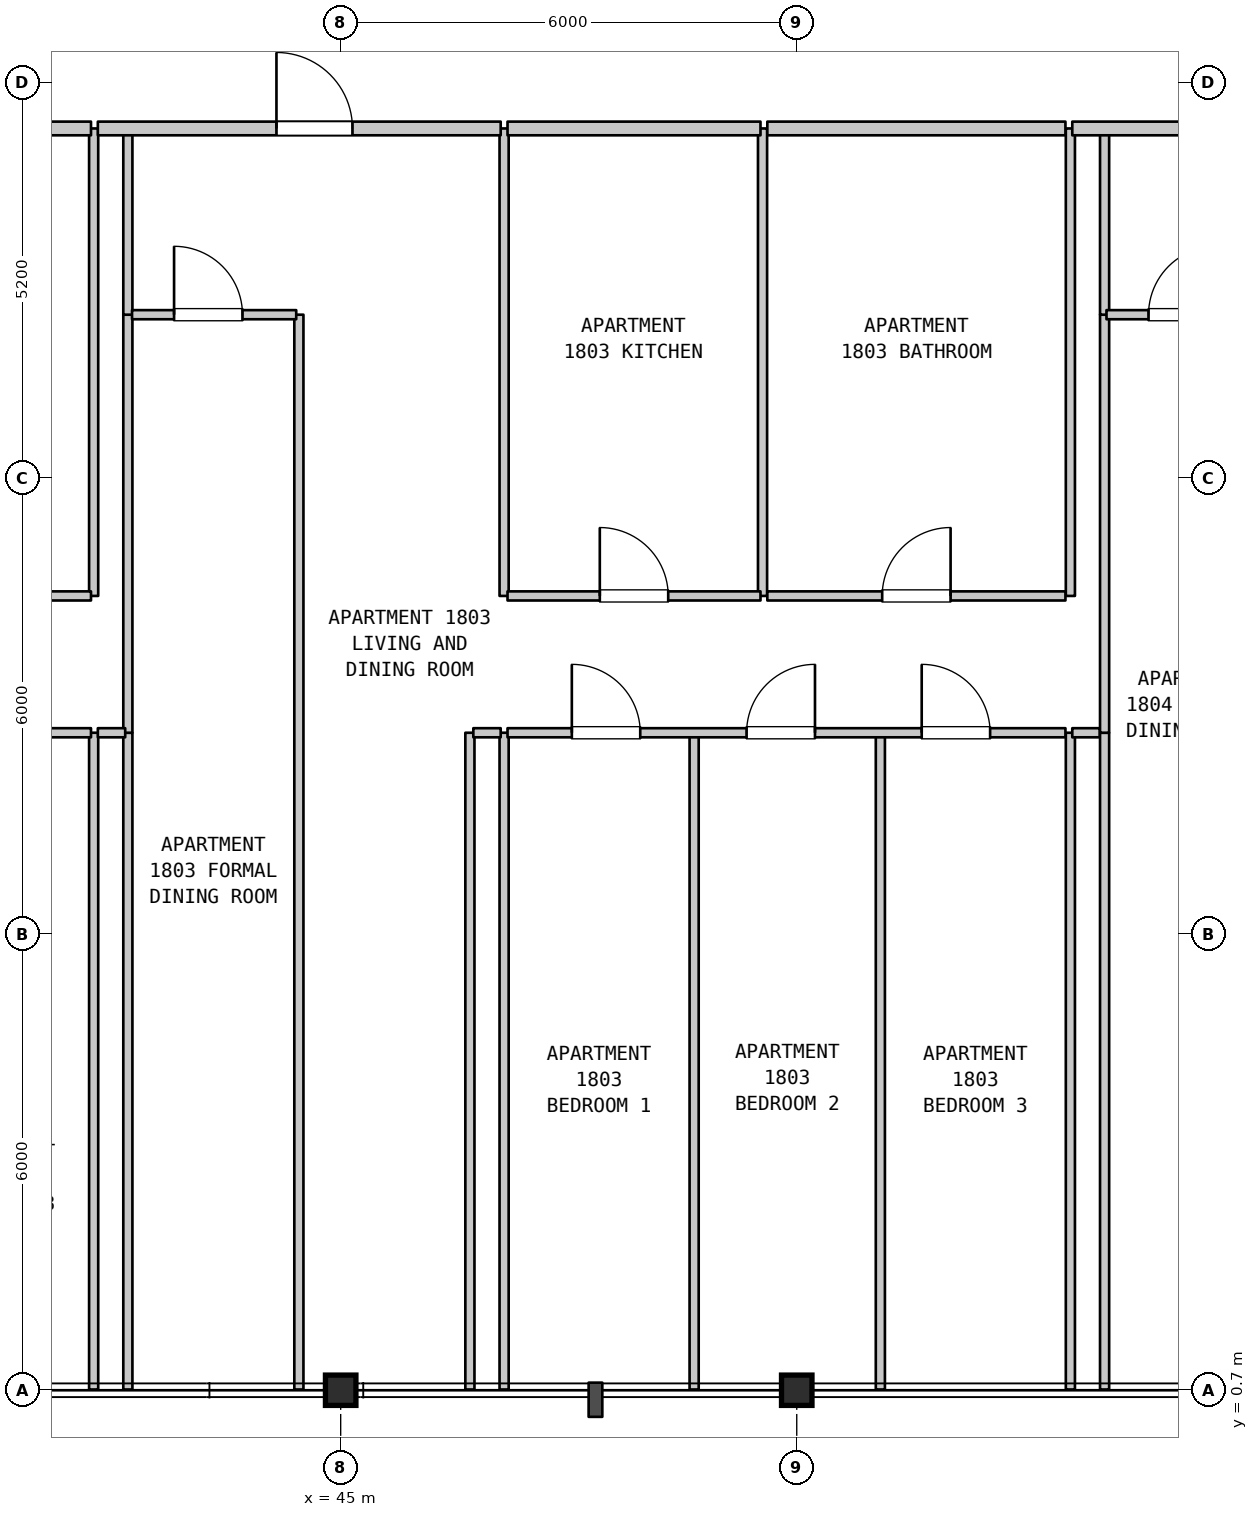
"""IFC4 building model, lengths in metres.
Left out: names, types, materials, properties, quantities, classifications, styles, units other than length and angle.
Written with IfcOpenShell. Run it as: python <this file> out.ifc"""

import sys

from ifc_helpers import new_model, si_unit, direction, frame, frame_2d, origin, origin_2d, place, context, subcontext, project, spatial, rectangle, i_section, extrude, element, fill, save


model = new_model("IFC4")
c1 = context("Model", 3, precision=1e-05, world=origin(), true_north=direction((0.0, 1.0)))
c2 = subcontext(c1, "Body", "Model", "MODEL_VIEW")
j1 = project(units=[si_unit("LENGTHUNIT", "METRE"), si_unit("PLANEANGLEUNIT", "RADIAN")], contexts=[c1])
p1 = place(None, origin())
s1 = spatial("IfcSite", under=j1, at=p1, CompositionType="ELEMENT")
p2 = place(p1, origin())
s2 = spatial("IfcBuilding", under=s1, at=p2, CompositionType="ELEMENT")
p3 = place(p2, frame((0.0, 0.0, 77.5)))
s3 = spatial("IfcBuildingStorey", under=s2, at=p3, CompositionType="ELEMENT", Elevation=77.5)
for number, where, z_axis, x_axis in (
    (1, (45.0, 0.7, 0.0), (0.0, 0.0, 1.0), (1.0, 0.0, 0.0)),
    (2, (51.0, 0.7, 0.0), (0.0, 0.0, 1.0), (1.0, 0.0, 0.0)),
):
    element("IfcColumn", number, at=place(p3, frame(where, z_axis=z_axis, x_axis=x_axis)), inside=s3, PredefinedType="COLUMN", context=c2, shape_type="SweptSolid", body=[
        extrude(i_section(OverallWidth=0.401, OverallDepth=0.399, WebThickness=0.025, FlangeThickness=0.04, FilletRadius=0.015, at=origin_2d()), origin(), (0.0, 0.0, 1.0), 3.7),
    ])
p4 = place(p3, frame((41.75, 0.71, 0.0), z_axis=(0.0, 0.0, 1.0), x_axis=(0.0, 1.0, 0.0)))
e3 = element("IfcWall", 3, at=p4, inside=s3, PredefinedType="PARTITIONING", context=c2, shape_type="SweptSolid", body=[
    extrude(rectangle(XDim=8.64, YDim=0.12, at=frame_2d((4.32, 0.0))), origin(), (0.0, 0.0, 1.0), 3.28),
])
p5 = place(p3, frame((41.75, 11.15, 0.0), z_axis=(0.0, 0.0, 1.0), x_axis=(0.0, 1.0, 0.0)))
e4 = element("IfcWall", 4, at=p5, inside=s3, PredefinedType="PARTITIONING", context=c2, shape_type="SweptSolid", body=[
    extrude(rectangle(XDim=6.15, YDim=0.12, at=frame_2d((3.075, 0.0))), origin(), (0.0, 0.0, 1.0), 3.28),
])
p6 = place(p3, frame((42.2, 0.71, 0.0), z_axis=(0.0, 0.0, 1.0), x_axis=(0.0, 1.0, 0.0)))
e5 = element("IfcWall", 5, at=p6, inside=s3, PredefinedType="PARTITIONING", context=c2, shape_type="SweptSolid", body=[
    extrude(rectangle(XDim=8.64, YDim=0.12, at=frame_2d((4.32, 0.0))), origin(), (0.0, 0.0, 1.0), 3.28),
])
p7 = place(p3, frame((42.2, 9.35, 0.0), z_axis=(0.0, 0.0, 1.0), x_axis=(0.0, 1.0, 0.0)))
e6 = element("IfcWall", 6, at=p7, inside=s3, PredefinedType="PARTITIONING", context=c2, shape_type="SweptSolid", body=[
    extrude(rectangle(XDim=5.5, YDim=0.12, at=frame_2d((2.75, 0.0))), origin(), (0.0, 0.0, 1.0), 3.28),
])
p8 = place(p3, frame((42.2, 14.85, 0.0), z_axis=(0.0, 0.0, 1.0), x_axis=(0.0, 1.0, 0.0)))
e7 = element("IfcWall", 7, at=p8, inside=s3, PredefinedType="PARTITIONING", context=c2, shape_type="SweptSolid", body=[
    extrude(rectangle(XDim=2.45, YDim=0.12, at=frame_2d((1.225, 0.0))), origin(), (0.0, 0.0, 1.0), 3.28),
])
p9 = place(p3, frame((44.45, 0.71, 0.0), z_axis=(0.0, 0.0, 1.0), x_axis=(0.0, 1.0, 0.0)))
e8 = element("IfcWall", 8, at=p9, inside=s3, PredefinedType="PARTITIONING", context=c2, shape_type="SweptSolid", body=[
    extrude(rectangle(XDim=14.14, YDim=0.12, at=frame_2d((7.07, 0.0))), origin(), (0.0, 0.0, 1.0), 3.28),
])
for number, where, z_axis, x_axis in (
    (9, (46.7, 0.71, 0.0), (0.0, 0.0, 1.0), (0.0, 1.0, 0.0)),
    (10, (47.15, 0.71, 0.0), (0.0, 0.0, 1.0), (0.0, 1.0, 0.0)),
):
    element("IfcWall", number, at=place(p3, frame(where, z_axis=z_axis, x_axis=x_axis)), inside=s3, PredefinedType="PARTITIONING", context=c2, shape_type="SweptSolid", body=[
        extrude(rectangle(XDim=8.64, YDim=0.12, at=frame_2d((4.32, 0.0))), origin(), (0.0, 0.0, 1.0), 3.28),
    ])
p10 = place(p3, frame((47.15, 11.15, 0.0), z_axis=(0.0, 0.0, 1.0), x_axis=(0.0, 1.0, 0.0)))
e11 = element("IfcWall", 11, at=p10, inside=s3, PredefinedType="PARTITIONING", context=c2, shape_type="SweptSolid", body=[
    extrude(rectangle(XDim=6.15, YDim=0.12, at=frame_2d((3.075, 0.0))), origin(), (0.0, 0.0, 1.0), 3.28),
])
p11 = place(p3, frame((49.65, 0.71, 0.0), z_axis=(0.0, 0.0, 1.0), x_axis=(0.0, 1.0, 0.0)))
e12 = element("IfcWall", 12, at=p11, inside=s3, PredefinedType="PARTITIONING", context=c2, shape_type="SweptSolid", body=[
    extrude(rectangle(XDim=8.64, YDim=0.12, at=frame_2d((4.32, 0.0))), origin(), (0.0, 0.0, 1.0), 3.28),
])
p12 = place(p3, frame((50.55, 11.15, 0.0), z_axis=(0.0, 0.0, 1.0), x_axis=(0.0, 1.0, 0.0)))
e13 = element("IfcWall", 13, at=p12, inside=s3, PredefinedType="PARTITIONING", context=c2, shape_type="SweptSolid", body=[
    extrude(rectangle(XDim=6.15, YDim=0.12, at=frame_2d((3.075, 0.0))), origin(), (0.0, 0.0, 1.0), 3.28),
])
for number, where, z_axis, x_axis in (
    (14, (52.1, 0.71, 0.0), (0.0, 0.0, 1.0), (0.0, 1.0, 0.0)),
    (15, (54.6, 0.71, 0.0), (0.0, 0.0, 1.0), (0.0, 1.0, 0.0)),
):
    element("IfcWall", number, at=place(p3, frame(where, z_axis=z_axis, x_axis=x_axis)), inside=s3, PredefinedType="PARTITIONING", context=c2, shape_type="SweptSolid", body=[
        extrude(rectangle(XDim=8.64, YDim=0.12, at=frame_2d((4.32, 0.0))), origin(), (0.0, 0.0, 1.0), 3.28),
    ])
p13 = place(p3, frame((54.6, 11.15, 0.0), z_axis=(0.0, 0.0, 1.0), x_axis=(0.0, 1.0, 0.0)))
e16 = element("IfcWall", 16, at=p13, inside=s3, PredefinedType="PARTITIONING", context=c2, shape_type="SweptSolid", body=[
    extrude(rectangle(XDim=6.15, YDim=0.12, at=frame_2d((3.075, 0.0))), origin(), (0.0, 0.0, 1.0), 3.28),
])
p14 = place(p3, frame((55.05, 0.71, 0.0), z_axis=(0.0, 0.0, 1.0), x_axis=(0.0, 1.0, 0.0)))
e17 = element("IfcWall", 17, at=p14, inside=s3, PredefinedType="PARTITIONING", context=c2, shape_type="SweptSolid", body=[
    extrude(rectangle(XDim=8.64, YDim=0.12, at=frame_2d((4.32, 0.0))), origin(), (0.0, 0.0, 1.0), 3.28),
])
p15 = place(p3, frame((55.05, 9.35, 0.0), z_axis=(0.0, 0.0, 1.0), x_axis=(0.0, 1.0, 0.0)))
e18 = element("IfcWall", 18, at=p15, inside=s3, PredefinedType="PARTITIONING", context=c2, shape_type="SweptSolid", body=[
    extrude(rectangle(XDim=5.5, YDim=0.12, at=frame_2d((2.75, 0.0))), origin(), (0.0, 0.0, 1.0), 3.28),
])
p16 = place(p3, frame((55.05, 14.85, 0.0), z_axis=(0.0, 0.0, 1.0), x_axis=(0.0, 1.0, 0.0)))
e19 = element("IfcWall", 19, at=p16, inside=s3, PredefinedType="PARTITIONING", context=c2, shape_type="SweptSolid", body=[
    extrude(rectangle(XDim=2.45, YDim=0.12, at=frame_2d((1.225, 0.0))), origin(), (0.0, 0.0, 1.0), 3.28),
])
p17 = place(p3, frame((34.635, 9.35, 0.0), z_axis=(0.0, 0.0, 1.0), x_axis=(1.0, 0.0, 0.0)))
e20 = element("IfcWall", 20, at=p17, inside=s3, PredefinedType="PARTITIONING", context=c2, shape_type="SweptSolid", body=[
    extrude(rectangle(XDim=7.08, YDim=0.12, at=frame_2d((3.54, 0.0))), origin(), (0.0, 0.0, 1.0), 3.28),
])
p18 = place(p17, frame((0.875, 0.0, 0.0)))
e21 = element("IfcOpeningElement", 21, at=p18, cuts=e20, PredefinedType="OPENING", context=c2, shape_type="SweptSolid", body=[
    extrude(rectangle(XDim=0.9, YDim=2.15, at=frame_2d((0.45, 1.075))), frame((0.0, 0.07, 0.0), z_axis=(0.0, -1.0, 0.0), x_axis=(1.0, 0.0, 0.0)), (0.0, 0.0, 1.0), 0.14),
])
p19 = place(p17, frame((3.019, 0.0, 0.0)))
e22 = element("IfcOpeningElement", 22, at=p19, cuts=e20, PredefinedType="OPENING", context=c2, shape_type="SweptSolid", body=[
    extrude(rectangle(XDim=0.9, YDim=2.15, at=frame_2d((0.45, 1.075))), frame((0.0, 0.07, 0.0), z_axis=(0.0, -1.0, 0.0), x_axis=(1.0, 0.0, 0.0)), (0.0, 0.0, 1.0), 0.14),
])
p20 = place(p17, frame((5.305, 0.0, 0.0)))
e23 = element("IfcOpeningElement", 23, at=p20, cuts=e20, PredefinedType="OPENING", context=c2, shape_type="SweptSolid", body=[
    extrude(rectangle(XDim=0.9, YDim=2.15, at=frame_2d((0.45, 1.075))), frame((0.0, 0.07, 0.0), z_axis=(0.0, -1.0, 0.0), x_axis=(1.0, 0.0, 0.0)), (0.0, 0.0, 1.0), 0.14),
])
p21 = place(p3, frame((41.805, 9.35, 0.0), z_axis=(0.0, 0.0, 1.0), x_axis=(1.0, 0.0, 0.0)))
e24 = element("IfcWall", 24, at=p21, inside=s3, PredefinedType="PARTITIONING", context=c2, shape_type="SweptSolid", body=[
    extrude(rectangle(XDim=0.36, YDim=0.12, at=frame_2d((0.18, 0.0))), origin(), (0.0, 0.0, 1.0), 3.28),
])
p22 = place(p3, frame((46.745, 9.35, 0.0), z_axis=(0.0, 0.0, 1.0), x_axis=(1.0, 0.0, 0.0)))
e25 = element("IfcWall", 25, at=p22, inside=s3, PredefinedType="PARTITIONING", context=c2, shape_type="SweptSolid", body=[
    extrude(rectangle(XDim=0.36, YDim=0.12, at=frame_2d((0.18, 0.0))), origin(), (0.0, 0.0, 1.0), 3.28),
])
p23 = place(p3, frame((47.195, 9.35, 0.0), z_axis=(0.0, 0.0, 1.0), x_axis=(1.0, 0.0, 0.0)))
e26 = element("IfcWall", 26, at=p23, inside=s3, PredefinedType="PARTITIONING", context=c2, shape_type="SweptSolid", body=[
    extrude(rectangle(XDim=7.34, YDim=0.12, at=frame_2d((3.67, 0.0))), origin(), (0.0, 0.0, 1.0), 3.28),
])
p24 = place(p23, frame((0.846, 0.0, 0.0)))
e27 = element("IfcOpeningElement", 27, at=p24, cuts=e26, PredefinedType="OPENING", context=c2, shape_type="SweptSolid", body=[
    extrude(rectangle(XDim=0.9, YDim=2.15, at=frame_2d((0.45, 1.075))), frame((0.0, 0.07, 0.0), z_axis=(0.0, -1.0, 0.0), x_axis=(1.0, 0.0, 0.0)), (0.0, 0.0, 1.0), 0.14),
])
p25 = place(p23, frame((3.145, 0.0, 0.0)))
e28 = element("IfcOpeningElement", 28, at=p25, cuts=e26, PredefinedType="OPENING", context=c2, shape_type="SweptSolid", body=[
    extrude(rectangle(XDim=0.9, YDim=2.15, at=frame_2d((0.45, 1.075))), frame((0.0, 0.07, 0.0), z_axis=(0.0, -1.0, 0.0), x_axis=(1.0, 0.0, 0.0)), (0.0, 0.0, 1.0), 0.14),
])
p26 = place(p23, frame((5.449, 0.0, 0.0)))
e29 = element("IfcOpeningElement", 29, at=p26, cuts=e26, PredefinedType="OPENING", context=c2, shape_type="SweptSolid", body=[
    extrude(rectangle(XDim=0.9, YDim=2.15, at=frame_2d((0.45, 1.075))), frame((0.0, 0.07, 0.0), z_axis=(0.0, -1.0, 0.0), x_axis=(1.0, 0.0, 0.0)), (0.0, 0.0, 1.0), 0.14),
])
p27 = place(p3, frame((54.625, 9.35, 0.0), z_axis=(0.0, 0.0, 1.0), x_axis=(1.0, 0.0, 0.0)))
e30 = element("IfcWall", 30, at=p27, inside=s3, PredefinedType="PARTITIONING", context=c2, shape_type="SweptSolid", body=[
    extrude(rectangle(XDim=0.36, YDim=0.12, at=frame_2d((0.18, 0.0))), origin(), (0.0, 0.0, 1.0), 3.28),
])
p28 = place(p3, frame((37.933, 11.15, 0.0), z_axis=(0.0, 0.0, 1.0), x_axis=(1.0, 0.0, 0.0)))
e31 = element("IfcWall", 31, at=p28, inside=s3, PredefinedType="PARTITIONING", context=c2, shape_type="SweptSolid", body=[
    extrude(rectangle(XDim=3.782, YDim=0.12, at=frame_2d((1.891, 0.0))), origin(), (0.0, 0.0, 1.0), 3.28),
])
p29 = place(p28, frame((1.369, 0.0, 0.0)))
e32 = element("IfcOpeningElement", 32, at=p29, cuts=e31, PredefinedType="OPENING", context=c2, shape_type="SweptSolid", body=[
    extrude(rectangle(XDim=0.9, YDim=2.1, at=frame_2d((0.45, 1.05))), frame((0.0, 0.07, 0.0), z_axis=(0.0, -1.0, 0.0), x_axis=(1.0, 0.0, 0.0)), (0.0, 0.0, 1.0), 0.14),
])
p30 = place(p3, frame((47.195, 11.15, 0.0), z_axis=(0.0, 0.0, 1.0), x_axis=(1.0, 0.0, 0.0)))
e33 = element("IfcWall", 33, at=p30, inside=s3, PredefinedType="PARTITIONING", context=c2, shape_type="SweptSolid", body=[
    extrude(rectangle(XDim=3.328, YDim=0.12, at=frame_2d((1.664, 0.0))), origin(), (0.0, 0.0, 1.0), 3.28),
])
p31 = place(p30, frame((1.214, 0.0, 0.0)))
e34 = element("IfcOpeningElement", 34, at=p31, cuts=e33, PredefinedType="OPENING", context=c2, shape_type="SweptSolid", body=[
    extrude(rectangle(XDim=0.9, YDim=2.15, at=frame_2d((0.45, 1.075))), frame((0.0, 0.07, 0.0), z_axis=(0.0, -1.0, 0.0), x_axis=(1.0, 0.0, 0.0)), (0.0, 0.0, 1.0), 0.14),
])
p32 = place(p3, frame((50.613, 11.15, 0.0), z_axis=(0.0, 0.0, 1.0), x_axis=(1.0, 0.0, 0.0)))
e35 = element("IfcWall", 35, at=p32, inside=s3, PredefinedType="PARTITIONING", context=c2, shape_type="SweptSolid", body=[
    extrude(rectangle(XDim=3.922, YDim=0.12, at=frame_2d((1.961, 0.0))), origin(), (0.0, 0.0, 1.0), 3.28),
])
p33 = place(p32, frame((1.511, 0.0, 0.0)))
e36 = element("IfcOpeningElement", 36, at=p33, cuts=e35, PredefinedType="OPENING", context=c2, shape_type="SweptSolid", body=[
    extrude(rectangle(XDim=0.9, YDim=2.1, at=frame_2d((0.45, 1.05))), frame((0.0, 0.07, 0.0), z_axis=(0.0, -1.0, 0.0), x_axis=(1.0, 0.0, 0.0)), (0.0, 0.0, 1.0), 0.14),
])
p34 = place(p3, frame((42.255, 14.85, 0.0), z_axis=(0.0, 0.0, 1.0), x_axis=(1.0, 0.0, 0.0)))
e37 = element("IfcWall", 37, at=p34, inside=s3, PredefinedType="PARTITIONING", context=c2, shape_type="SweptSolid", body=[
    extrude(rectangle(XDim=2.16, YDim=0.12, at=frame_2d((1.08, 0.0))), origin(), (0.0, 0.0, 1.0), 3.28),
])
p35 = place(p34, frame((0.553, 0.0, 0.0)))
e38 = element("IfcOpeningElement", 38, at=p35, cuts=e37, PredefinedType="OPENING", context=c2, shape_type="SweptSolid", body=[
    extrude(rectangle(XDim=0.9, YDim=2.15, at=frame_2d((0.45, 1.075))), frame((0.0, 0.07, 0.0), z_axis=(0.0, -1.0, 0.0), x_axis=(1.0, 0.0, 0.0)), (0.0, 0.0, 1.0), 0.14),
])
p36 = place(p3, frame((55.075, 14.85, 0.0), z_axis=(0.0, 0.0, 1.0), x_axis=(1.0, 0.0, 0.0)))
e39 = element("IfcWall", 39, at=p36, inside=s3, PredefinedType="PARTITIONING", context=c2, shape_type="SweptSolid", body=[
    extrude(rectangle(XDim=2.16, YDim=0.12, at=frame_2d((1.08, 0.0))), origin(), (0.0, 0.0, 1.0), 3.28),
])
p37 = place(p36, frame((0.553, 0.0, 0.0)))
e40 = element("IfcOpeningElement", 40, at=p37, cuts=e39, PredefinedType="OPENING", context=c2, shape_type="SweptSolid", body=[
    extrude(rectangle(XDim=0.9, YDim=2.15, at=frame_2d((0.45, 1.075))), frame((0.0, 0.07, 0.0), z_axis=(0.0, -1.0, 0.0), x_axis=(1.0, 0.0, 0.0)), (0.0, 0.0, 1.0), 0.14),
])
p38 = place(p3, frame((37.933, 17.3, 0.0), z_axis=(0.0, 0.0, 1.0), x_axis=(1.0, 0.0, 0.0)))
e41 = element("IfcWall", 41, at=p38, inside=s3, PredefinedType="STANDARD", context=c2, shape_type="SweptSolid", body=[
    extrude(rectangle(XDim=3.782, YDim=0.18, at=frame_2d((1.891, 0.0))), origin(), (0.0, 0.0, 1.0), 3.28),
])
p39 = place(p3, frame((41.805, 17.3, 0.0), z_axis=(0.0, 0.0, 1.0), x_axis=(1.0, 0.0, 0.0)))
e42 = element("IfcWall", 42, at=p39, inside=s3, PredefinedType="STANDARD", context=c2, shape_type="SweptSolid", body=[
    extrude(rectangle(XDim=5.3, YDim=0.18, at=frame_2d((2.65, 0.0))), origin(), (0.0, 0.0, 1.0), 3.28),
])
p40 = place(p39, frame((2.35, 0.0, 0.0)))
e43 = element("IfcOpeningElement", 43, at=p40, cuts=e42, PredefinedType="OPENING", context=c2, shape_type="SweptSolid", body=[
    extrude(rectangle(XDim=1.0, YDim=2.15, at=frame_2d((0.5, 1.075))), frame((0.0, 0.1, 0.0), z_axis=(0.0, -1.0, 0.0), x_axis=(1.0, 0.0, 0.0)), (0.0, 0.0, 1.0), 0.2),
])
p41 = place(p3, frame((47.195, 17.3, 0.0), z_axis=(0.0, 0.0, 1.0), x_axis=(1.0, 0.0, 0.0)))
e44 = element("IfcWall", 44, at=p41, inside=s3, PredefinedType="STANDARD", context=c2, shape_type="SweptSolid", body=[
    extrude(rectangle(XDim=3.328, YDim=0.18, at=frame_2d((1.664, 0.0))), origin(), (0.0, 0.0, 1.0), 3.28),
])
p42 = place(p3, frame((50.613, 17.3, 0.0), z_axis=(0.0, 0.0, 1.0), x_axis=(1.0, 0.0, 0.0)))
e45 = element("IfcWall", 45, at=p42, inside=s3, PredefinedType="STANDARD", context=c2, shape_type="SweptSolid", body=[
    extrude(rectangle(XDim=3.922, YDim=0.18, at=frame_2d((1.961, 0.0))), origin(), (0.0, 0.0, 1.0), 3.28),
])
p43 = place(p3, frame((54.625, 17.3, 0.0), z_axis=(0.0, 0.0, 1.0), x_axis=(1.0, 0.0, 0.0)))
e46 = element("IfcWall", 46, at=p43, inside=s3, PredefinedType="STANDARD", context=c2, shape_type="SweptSolid", body=[
    extrude(rectangle(XDim=5.545, YDim=0.18, at=frame_2d((2.772, 0.0))), origin(), (0.0, 0.0, 1.0), 3.28),
])
p44 = place(p43, frame((3.138, 0.0, 0.0)))
e47 = element("IfcOpeningElement", 47, at=p44, cuts=e46, PredefinedType="OPENING", context=c2, shape_type="SweptSolid", body=[
    extrude(rectangle(XDim=1.0, YDim=2.15, at=frame_2d((0.5, 1.075))), frame((0.0, 0.1, 0.0), z_axis=(0.0, -1.0, 0.0), x_axis=(1.0, 0.0, 0.0)), (0.0, 0.0, 1.0), 0.2),
])
p45 = place(p24, origin())
e48 = element("IfcDoor", 48, at=p45, inside=s3, OperationType="SINGLE_SWING_LEFT", PredefinedType="DOOR", context=c2, shape_type="SweptSolid", body=[
    extrude(rectangle(XDim=0.9, YDim=2.15, at=frame_2d((0.45, 1.075))), frame((0.0, 0.025, 0.0), z_axis=(0.0, -1.0, 0.0), x_axis=(1.0, 0.0, 0.0)), (0.0, 0.0, 1.0), 0.05),
])
fill(e27, e48)
p46 = place(p25, origin())
e49 = element("IfcDoor", 49, at=p46, inside=s3, OperationType="SINGLE_SWING_RIGHT", PredefinedType="DOOR", context=c2, shape_type="SweptSolid", body=[
    extrude(rectangle(XDim=0.9, YDim=2.15, at=frame_2d((0.45, 1.075))), frame((0.0, 0.025, 0.0), z_axis=(0.0, -1.0, 0.0), x_axis=(1.0, 0.0, 0.0)), (0.0, 0.0, 1.0), 0.05),
])
fill(e28, e49)
p47 = place(p26, origin())
e50 = element("IfcDoor", 50, at=p47, inside=s3, OperationType="SINGLE_SWING_LEFT", PredefinedType="DOOR", context=c2, shape_type="SweptSolid", body=[
    extrude(rectangle(XDim=0.9, YDim=2.15, at=frame_2d((0.45, 1.075))), frame((0.0, 0.025, 0.0), z_axis=(0.0, -1.0, 0.0), x_axis=(1.0, 0.0, 0.0)), (0.0, 0.0, 1.0), 0.05),
])
fill(e29, e50)
p48 = place(p31, origin())
e51 = element("IfcDoor", 51, at=p48, inside=s3, OperationType="SINGLE_SWING_LEFT", PredefinedType="DOOR", context=c2, shape_type="SweptSolid", body=[
    extrude(rectangle(XDim=0.9, YDim=2.15, at=frame_2d((0.45, 1.075))), frame((0.0, 0.025, 0.0), z_axis=(0.0, -1.0, 0.0), x_axis=(1.0, 0.0, 0.0)), (0.0, 0.0, 1.0), 0.05),
])
fill(e34, e51)
p49 = place(p33, origin())
e52 = element("IfcDoor", 52, at=p49, inside=s3, OperationType="SINGLE_SWING_RIGHT", PredefinedType="DOOR", context=c2, shape_type="SweptSolid", body=[
    extrude(rectangle(XDim=0.9, YDim=2.1, at=frame_2d((0.45, 1.05))), frame((0.0, 0.025, 0.0), z_axis=(0.0, -1.0, 0.0), x_axis=(1.0, 0.0, 0.0)), (0.0, 0.0, 1.0), 0.05),
])
fill(e36, e52)
p50 = place(p35, origin())
e53 = element("IfcDoor", 53, at=p50, inside=s3, OperationType="SINGLE_SWING_LEFT", PredefinedType="DOOR", context=c2, shape_type="SweptSolid", body=[
    extrude(rectangle(XDim=0.9, YDim=2.15, at=frame_2d((0.45, 1.075))), frame((0.0, 0.025, 0.0), z_axis=(0.0, -1.0, 0.0), x_axis=(1.0, 0.0, 0.0)), (0.0, 0.0, 1.0), 0.05),
])
fill(e38, e53)
p51 = place(p37, origin())
e54 = element("IfcDoor", 54, at=p51, inside=s3, OperationType="SINGLE_SWING_RIGHT", PredefinedType="DOOR", context=c2, shape_type="SweptSolid", body=[
    extrude(rectangle(XDim=0.9, YDim=2.15, at=frame_2d((0.45, 1.075))), frame((0.0, 0.025, 0.0), z_axis=(0.0, -1.0, 0.0), x_axis=(1.0, 0.0, 0.0)), (0.0, 0.0, 1.0), 0.05),
])
fill(e40, e54)
p52 = place(p40, origin())
e55 = element("IfcDoor", 55, at=p52, inside=s3, OperationType="SINGLE_SWING_LEFT", PredefinedType="DOOR", context=c2, shape_type="SweptSolid", body=[
    extrude(rectangle(XDim=1.0, YDim=2.15, at=frame_2d((0.5, 1.075))), frame((0.0, 0.025, 0.0), z_axis=(0.0, -1.0, 0.0), x_axis=(1.0, 0.0, 0.0)), (0.0, 0.0, 1.0), 0.05),
])
fill(e43, e55)
save(model, sys.argv[1])
